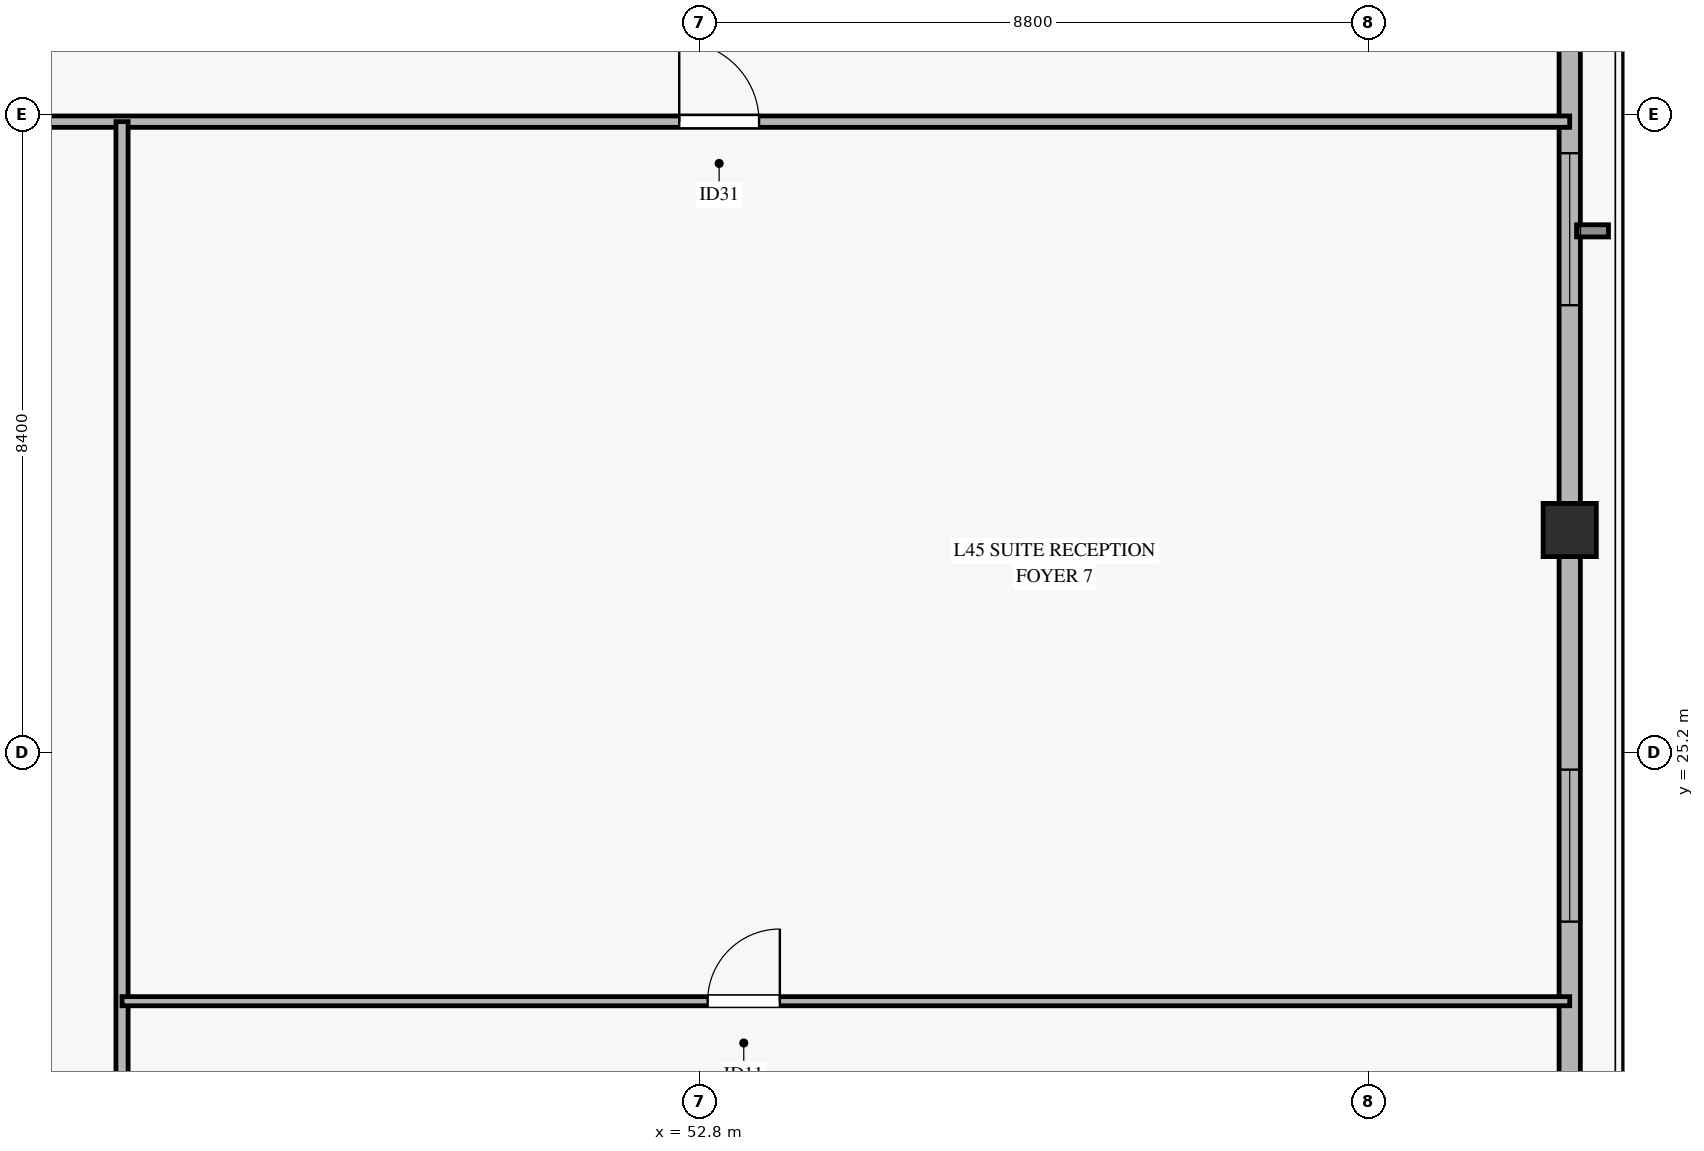
"""IFC4 building model, lengths in metres.
Left out: names, types, materials, properties, quantities, classifications, styles, units other than length and angle.
Written with IfcOpenShell. Run it as: python <this file> out.ifc"""

import sys

from ifc_helpers import new_model, si_unit, direction, frame, frame_2d, origin, origin_2d, place, context, subcontext, project, spatial, rectangle, hollow_rectangle, extrude, source, transform, mapped, element, fill, save


model = new_model("IFC4")
c1 = context("Model", 3, precision=1e-05, world=origin(), true_north=direction((0.0, 1.0)))
c2 = subcontext(c1, "Body", "Model", "MODEL_VIEW")
j1 = project(units=[si_unit("LENGTHUNIT", "METRE"), si_unit("PLANEANGLEUNIT", "RADIAN")], contexts=[c1])
p1 = place(None, origin())
s1 = spatial("IfcSite", under=j1, at=p1, CompositionType="ELEMENT")
p2 = place(p1, origin())
s2 = spatial("IfcBuilding", under=s1, at=p2, CompositionType="ELEMENT")
p3 = place(p2, frame((0.0, 0.0, 180.7)))
s3 = spatial("IfcBuildingStorey", under=s2, at=p3, CompositionType="ELEMENT", Elevation=180.7)
m1 = source(origin(), c2, "Body", "SweptSolid", [
    extrude(hollow_rectangle(XDim=0.7, YDim=0.7, WallThickness=0.032, at=origin_2d()), origin(), (0.0, 0.0, 1.0), 3.27),
])
p4 = place(p3, frame((64.247, 28.127, 0.0), z_axis=(0.0, 0.0, 1.0), x_axis=(1.0, 0.0, 0.0)))
e1 = element("IfcColumn", 1, at=p4, inside=s3, PredefinedType="COLUMN", context=c2, shape_type="MappedRepresentation", body=[
    mapped(m1, transform((0.0, 0.0, 0.0), x_axis=(1.0, 0.0, 0.0), y_axis=(0.0, 1.0, 0.0), z_axis=(0.0, 0.0, 1.0), scale=1.0)),
])
p5 = place(p3, frame((64.247, 13.015, 0.0), z_axis=(0.0, 0.0, 1.0), x_axis=(0.0, 1.0, 0.0)))
e2 = element("IfcWall", 2, at=p5, inside=s3, PredefinedType="SOLIDWALL", context=c2, shape_type="SweptSolid", body=[
    extrude(rectangle(XDim=14.762, YDim=0.28, at=frame_2d((7.381, 0.0))), origin(), (0.0, 0.0, 1.0), 2.75),
])
p6 = place(p5, frame((3.078, 0.0, 0.45)))
e3 = element("IfcOpeningElement", 3, at=p6, cuts=e2, PredefinedType="OPENING", context=c2, shape_type="SweptSolid", body=[
    extrude(rectangle(XDim=2.0, YDim=2.0, at=frame_2d((1.0, 1.0))), frame((0.0, 0.15, 0.0), z_axis=(0.0, -1.0, 0.0), x_axis=(1.0, 0.0, 0.0)), (0.0, 0.0, 1.0), 0.3),
])
p7 = place(p5, frame((9.959, 0.0, 0.45)))
e4 = element("IfcOpeningElement", 4, at=p7, cuts=e2, PredefinedType="OPENING", context=c2, shape_type="SweptSolid", body=[
    extrude(rectangle(XDim=2.0, YDim=2.0, at=frame_2d((1.0, 1.0))), frame((0.0, 0.15, 0.0), z_axis=(0.0, -1.0, 0.0), x_axis=(1.0, 0.0, 0.0)), (0.0, 0.0, 1.0), 0.3),
])
p8 = place(p3, frame((64.247, 28.477, 0.0), z_axis=(0.0, 0.0, 1.0), x_axis=(0.0, 1.0, 0.0)))
e5 = element("IfcWall", 5, at=p8, inside=s3, PredefinedType="SOLIDWALL", context=c2, shape_type="SweptSolid", body=[
    extrude(rectangle(XDim=14.762, YDim=0.28, at=frame_2d((7.381, 0.0))), origin(), (0.0, 0.0, 1.0), 2.75),
])
p9 = place(p8, frame((2.608, 0.0, 0.45)))
e6 = element("IfcOpeningElement", 6, at=p9, cuts=e5, PredefinedType="OPENING", context=c2, shape_type="SweptSolid", body=[
    extrude(rectangle(XDim=2.0, YDim=2.0, at=frame_2d((1.0, 1.0))), frame((0.0, 0.15, 0.0), z_axis=(0.0, -1.0, 0.0), x_axis=(1.0, 0.0, 0.0)), (0.0, 0.0, 1.0), 0.3),
])
p10 = place(p3, frame((6.154, 33.5, 0.0), z_axis=(0.0, 0.0, 1.0), x_axis=(1.0, 0.0, 0.0)))
e7 = element("IfcWall", 7, at=p10, inside=s3, PredefinedType="PARTITIONING", context=c2, shape_type="SweptSolid", body=[
    extrude(rectangle(XDim=58.093, YDim=0.15, at=frame_2d((29.046, 0.0))), origin(), (0.0, 0.0, 1.0), 2.455),
])
p11 = place(p10, frame((6.125, 0.0, 0.0)))
e8 = element("IfcOpeningElement", 8, at=p11, cuts=e7, PredefinedType="OPENING", context=c2, shape_type="SweptSolid", body=[
    extrude(rectangle(XDim=1.05, YDim=2.15, at=frame_2d((0.525, 1.075))), frame((0.0, 0.085, 0.0), z_axis=(0.0, -1.0, 0.0), x_axis=(1.0, 0.0, 0.0)), (0.0, 0.0, 1.0), 0.17),
])
p12 = place(p10, frame((17.757, 0.0, 0.0)))
e9 = element("IfcOpeningElement", 9, at=p12, cuts=e7, PredefinedType="OPENING", context=c2, shape_type="SweptSolid", body=[
    extrude(rectangle(XDim=1.05, YDim=2.15, at=frame_2d((0.525, 1.075))), frame((0.0, 0.085, 0.0), z_axis=(0.0, -1.0, 0.0), x_axis=(1.0, 0.0, 0.0)), (0.0, 0.0, 1.0), 0.17),
])
p13 = place(p10, frame((23.087, 0.0, 0.0)))
e10 = element("IfcOpeningElement", 10, at=p13, cuts=e7, PredefinedType="OPENING", context=c2, shape_type="SweptSolid", body=[
    extrude(rectangle(XDim=1.05, YDim=2.15, at=frame_2d((0.525, 1.075))), frame((0.0, 0.085, 0.0), z_axis=(0.0, -1.0, 0.0), x_axis=(1.0, 0.0, 0.0)), (0.0, 0.0, 1.0), 0.17),
])
p14 = place(p10, frame((27.762, 0.0, 0.0)))
e11 = element("IfcOpeningElement", 11, at=p14, cuts=e7, PredefinedType="OPENING", context=c2, shape_type="SweptSolid", body=[
    extrude(rectangle(XDim=1.05, YDim=2.15, at=frame_2d((0.525, 1.075))), frame((0.0, 0.085, 0.0), z_axis=(0.0, -1.0, 0.0), x_axis=(1.0, 0.0, 0.0)), (0.0, 0.0, 1.0), 0.17),
])
p15 = place(p10, frame((32.162, 0.0, 0.0)))
e12 = element("IfcOpeningElement", 12, at=p15, cuts=e7, PredefinedType="OPENING", context=c2, shape_type="SweptSolid", body=[
    extrude(rectangle(XDim=1.05, YDim=2.15, at=frame_2d((0.525, 1.075))), frame((0.0, 0.085, 0.0), z_axis=(0.0, -1.0, 0.0), x_axis=(1.0, 0.0, 0.0)), (0.0, 0.0, 1.0), 0.17),
])
p16 = place(p10, frame((36.642, 0.0, 0.0)))
e13 = element("IfcOpeningElement", 13, at=p16, cuts=e7, PredefinedType="OPENING", context=c2, shape_type="SweptSolid", body=[
    extrude(rectangle(XDim=1.05, YDim=2.15, at=frame_2d((0.525, 1.075))), frame((0.0, 0.085, 0.0), z_axis=(0.0, -1.0, 0.0), x_axis=(1.0, 0.0, 0.0)), (0.0, 0.0, 1.0), 0.17),
])
p17 = place(p10, frame((46.377, 0.0, 0.0)))
e14 = element("IfcOpeningElement", 14, at=p17, cuts=e7, PredefinedType="OPENING", context=c2, shape_type="SweptSolid", body=[
    extrude(rectangle(XDim=1.05, YDim=2.15, at=frame_2d((0.525, 1.075))), frame((0.0, 0.085, 0.0), z_axis=(0.0, -1.0, 0.0), x_axis=(1.0, 0.0, 0.0)), (0.0, 0.0, 1.0), 0.17),
])
p18 = place(p3, frame((45.2, 10.154, 0.0), z_axis=(0.0, 0.0, 1.0), x_axis=(0.0, 1.0, 0.0)))
e15 = element("IfcWall", 15, at=p18, inside=s3, PredefinedType="PARTITIONING", context=c2, shape_type="SweptSolid", body=[
    extrude(rectangle(XDim=23.346, YDim=0.16, at=frame_2d((11.673, 0.0))), origin(), (0.0, 0.0, 1.0), 2.755),
])
p19 = place(p3, frame((45.2, 21.927, 0.0), z_axis=(0.0, 0.0, 1.0), x_axis=(1.0, 0.0, 0.0)))
e16 = element("IfcWall", 16, at=p19, inside=s3, PredefinedType="PARTITIONING", context=c2, shape_type="SweptSolid", body=[
    extrude(rectangle(XDim=19.047, YDim=0.12, at=frame_2d((9.523, 0.0))), origin(), (0.0, 0.0, 1.0), 2.455),
])
p20 = place(p19, frame((7.705, 0.0, 0.0)))
e17 = element("IfcOpeningElement", 17, at=p20, cuts=e16, PredefinedType="OPENING", context=c2, shape_type="SweptSolid", body=[
    extrude(rectangle(XDim=0.95, YDim=2.1, at=frame_2d((0.475, 1.05))), frame((0.0, 0.07, 0.0), z_axis=(0.0, -1.0, 0.0), x_axis=(1.0, 0.0, 0.0)), (0.0, 0.0, 1.0), 0.14),
])
m2 = source(origin(), c2, "Body", "SweptSolid", [
    extrude(rectangle(XDim=2.0, YDim=2.0, at=frame_2d((1.0, 1.0))), frame((0.0, 0.03, 0.0), z_axis=(0.0, -1.0, 0.0), x_axis=(1.0, 0.0, 0.0)), (0.0, 0.0, 1.0), 0.06),
])
p21 = place(p7, origin())
e18 = element("IfcWindow", 18, at=p21, inside=s3, PartitioningType="SINGLE_PANEL", PredefinedType="WINDOW", context=c2, shape_type="MappedRepresentation", body=[
    mapped(m2, transform((0.0, 0.0, 0.0), x_axis=(1.0, 0.0, 0.0), y_axis=(0.0, 1.0, 0.0), z_axis=(0.0, 0.0, 1.0), scale=1.0)),
])
fill(e4, e18)
p22 = place(p9, origin())
e19 = element("IfcWindow", 19, at=p22, inside=s3, PartitioningType="SINGLE_PANEL", PredefinedType="WINDOW", context=c2, shape_type="MappedRepresentation", body=[
    mapped(m2, transform((0.0, 0.0, 0.0), x_axis=(1.0, 0.0, 0.0), y_axis=(0.0, 1.0, 0.0), z_axis=(0.0, 0.0, 1.0), scale=1.0)),
])
fill(e6, e19)
m3 = source(origin(), c2, "Body", "SweptSolid", [
    extrude(rectangle(XDim=1.05, YDim=2.15, at=frame_2d((0.525, 1.075))), frame((0.0, 0.025, 0.0), z_axis=(0.0, -1.0, 0.0), x_axis=(1.0, 0.0, 0.0)), (0.0, 0.0, 1.0), 0.05),
])
p23 = place(p17, origin())
e20 = element("IfcDoor", 20, at=p23, inside=s3, OperationType="SINGLE_SWING_LEFT", PredefinedType="DOOR", context=c2, shape_type="MappedRepresentation", body=[
    mapped(m3, transform((0.0, 0.0, 0.0), x_axis=(1.0, 0.0, 0.0), y_axis=(0.0, 1.0, 0.0), z_axis=(0.0, 0.0, 1.0), scale=1.0)),
])
fill(e14, e20)
m4 = source(origin(), c2, "Body", "SweptSolid", [
    extrude(rectangle(XDim=0.95, YDim=2.1, at=frame_2d((0.475, 1.05))), frame((0.0, 0.025, 0.0), z_axis=(0.0, -1.0, 0.0), x_axis=(1.0, 0.0, 0.0)), (0.0, 0.0, 1.0), 0.05),
])
p24 = place(p20, origin())
e21 = element("IfcDoor", 21, at=p24, inside=s3, OperationType="SINGLE_SWING_RIGHT", PredefinedType="DOOR", context=c2, shape_type="MappedRepresentation", body=[
    mapped(m4, transform((0.0, 0.0, 0.0), x_axis=(1.0, 0.0, 0.0), y_axis=(0.0, 1.0, 0.0), z_axis=(0.0, 0.0, 1.0), scale=1.0)),
])
fill(e17, e21)
save(model, sys.argv[1])
